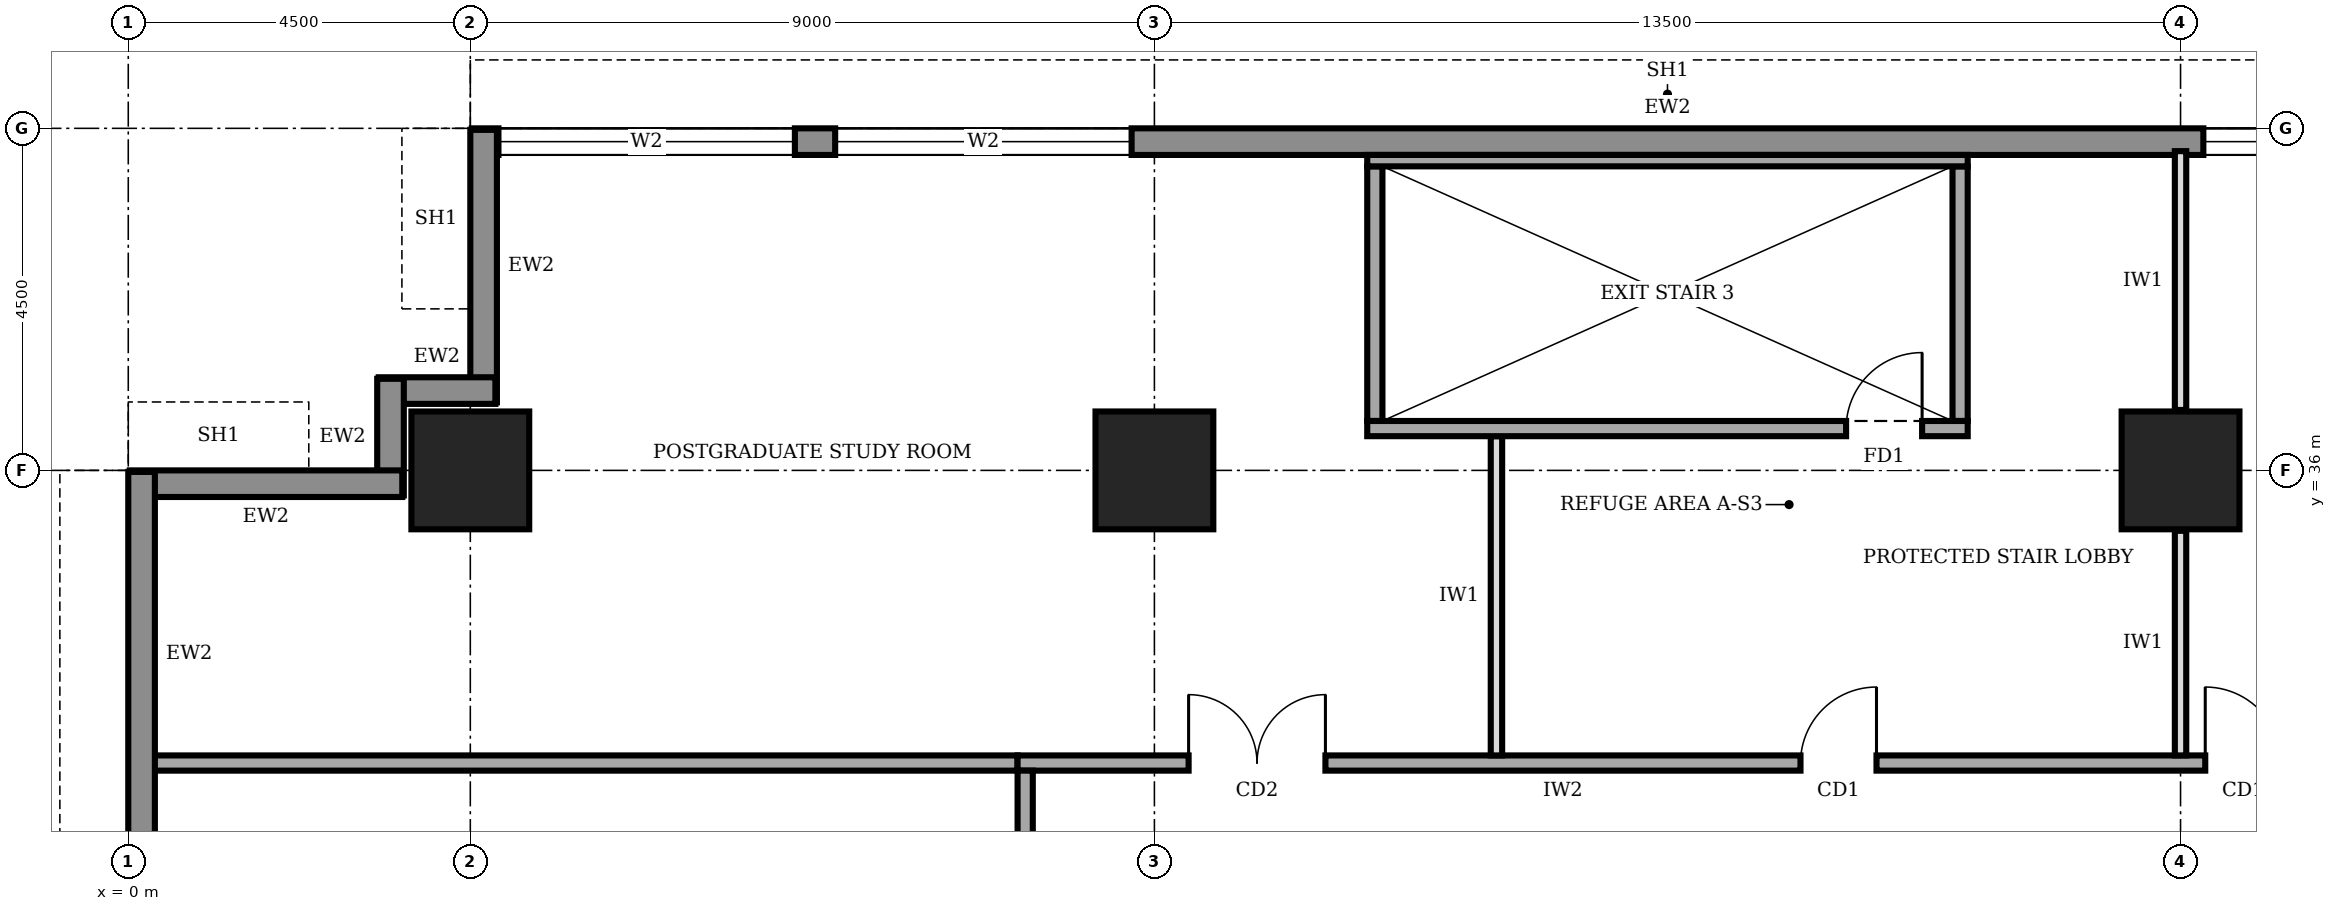
"""IFC4 building model, lengths in metres.
Left out: names, types, materials, properties, quantities, classifications, styles, units other than length and angle.
Written with IfcOpenShell. Run it as: python <this file> out.ifc"""

import sys

from ifc_helpers import new_model, si_unit, direction, frame, frame_2d, origin, origin_2d, place, context, subcontext, project, spatial, rectangle, extrude, element, fill, save


model = new_model("IFC4")
c1 = context("Model", 3, precision=1e-05, world=origin(), true_north=direction((0.0, 1.0)))
c2 = subcontext(c1, "Body", "Model", "MODEL_VIEW")
j1 = project(units=[si_unit("LENGTHUNIT", "METRE"), si_unit("PLANEANGLEUNIT", "RADIAN")], contexts=[c1])
p1 = place(None, origin())
s1 = spatial("IfcSite", under=j1, at=p1, CompositionType="ELEMENT")
p2 = place(p1, origin())
s2 = spatial("IfcBuilding", under=s1, at=p2, CompositionType="ELEMENT")
p3 = place(p2, frame((0.0, 0.0, 233.0)))
s3 = spatial("IfcBuildingStorey", under=s2, at=p3, CompositionType="ELEMENT", Elevation=233.0)
for number, where, z_axis, x_axis in (
    (1, (4.5, 36.0, 0.0), (0.0, 0.0, 1.0), (1.0, 0.0, 0.0)),
    (2, (13.5, 36.0, 0.0), (0.0, 0.0, 1.0), (1.0, 0.0, 0.0)),
    (3, (27.0, 36.0, 0.0), (0.0, 0.0, 1.0), (1.0, 0.0, 0.0)),
):
    element("IfcColumn", number, at=place(p3, frame(where, z_axis=z_axis, x_axis=x_axis)), inside=s3, PredefinedType="COLUMN", context=c2, shape_type="SweptSolid", body=[
        extrude(rectangle(XDim=1.55, YDim=1.55, at=origin_2d()), origin(), (0.0, 0.0, 1.0), 4.0),
    ])
p4 = place(p3, frame((35.98, 40.325, 0.0), z_axis=(0.0, 0.0, 1.0), x_axis=(-1.0, 0.0, 0.0)))
e4 = element("IfcWall", 4, at=p4, inside=s3, PredefinedType="STANDARD", context=c2, shape_type="SweptSolid", body=[
    extrude(rectangle(XDim=31.46, YDim=0.35, at=frame_2d((15.73, 0.0))), origin(), (0.0, 0.0, 1.0), 3.75),
])
p5 = place(p4, frame((27.21, 0.0, 0.6)))
e5 = element("IfcOpeningElement", 5, at=p5, cuts=e4, PredefinedType="OPENING", context=c2, shape_type="SweptSolid", body=[
    extrude(rectangle(XDim=3.9, YDim=2.6, at=frame_2d((1.95, 1.3))), frame((0.0, 0.185, 0.0), z_axis=(0.0, -1.0, 0.0), x_axis=(1.0, 0.0, 0.0)), (0.0, 0.0, 1.0), 0.37),
])
p6 = place(p4, frame((22.78, 0.0, 0.6)))
e6 = element("IfcOpeningElement", 6, at=p6, cuts=e4, PredefinedType="OPENING", context=c2, shape_type="SweptSolid", body=[
    extrude(rectangle(XDim=3.9, YDim=2.6, at=frame_2d((1.95, 1.3))), frame((0.0, 0.185, 0.0), z_axis=(0.0, -1.0, 0.0), x_axis=(1.0, 0.0, 0.0)), (0.0, 0.0, 1.0), 0.37),
])
p7 = place(p4, frame((4.78, 0.0, 0.6)))
e7 = element("IfcOpeningElement", 7, at=p7, cuts=e4, PredefinedType="OPENING", context=c2, shape_type="SweptSolid", body=[
    extrude(rectangle(XDim=3.9, YDim=2.6, at=frame_2d((1.95, 1.3))), frame((0.0, 0.185, 0.0), z_axis=(0.0, -1.0, 0.0), x_axis=(1.0, 0.0, 0.0)), (0.0, 0.0, 1.0), 0.37),
])
p8 = place(p3, frame((4.675, 40.48, 0.0), z_axis=(0.0, 0.0, 1.0), x_axis=(0.0, -1.0, 0.0)))
e8 = element("IfcWall", 8, at=p8, inside=s3, PredefinedType="STANDARD", context=c2, shape_type="SweptSolid", body=[
    extrude(rectangle(XDim=3.585, YDim=0.35, at=frame_2d((1.792, 0.0))), origin(), (0.0, 0.0, 1.0), 2.85),
])
for number, where, z_axis, x_axis in (
    (9, (4.83, 37.05, 0.0), (0.0, 0.0, 1.0), (-1.0, 0.0, 0.0)),
    (10, (3.45, 37.205, 0.0), (0.0, 0.0, 1.0), (0.0, -1.0, 0.0)),
):
    element("IfcWall", number, at=place(p3, frame(where, z_axis=z_axis, x_axis=x_axis)), inside=s3, PredefinedType="STANDARD", context=c2, shape_type="SweptSolid", body=[
        extrude(rectangle(XDim=1.535, YDim=0.35, at=frame_2d((0.768, 0.0))), origin(), (0.0, 0.0, 1.0), 3.75),
    ])
p9 = place(p3, frame((3.605, 35.825, 0.0), z_axis=(0.0, 0.0, 1.0), x_axis=(-1.0, 0.0, 0.0)))
e11 = element("IfcWall", 11, at=p9, inside=s3, PredefinedType="STANDARD", context=c2, shape_type="SweptSolid", body=[
    extrude(rectangle(XDim=3.585, YDim=0.35, at=frame_2d((1.792, 0.0))), origin(), (0.0, 0.0, 1.0), 2.85),
])
p10 = place(p3, frame((0.175, 35.98, 0.0), z_axis=(0.0, 0.0, 1.0), x_axis=(0.0, -1.0, 0.0)))
e12 = element("IfcWall", 12, at=p10, inside=s3, PredefinedType="STANDARD", context=c2, shape_type="SweptSolid", body=[
    extrude(rectangle(XDim=31.46, YDim=0.35, at=frame_2d((15.73, 0.0))), origin(), (0.0, 0.0, 1.0), 3.75),
])
p11 = place(p10, frame((27.21, 0.0, 0.6)))
e13 = element("IfcOpeningElement", 13, at=p11, cuts=e12, PredefinedType="OPENING", context=c2, shape_type="SweptSolid", body=[
    extrude(rectangle(XDim=3.9, YDim=2.6, at=frame_2d((1.95, 1.3))), frame((0.0, 0.185, 0.0), z_axis=(0.0, -1.0, 0.0), x_axis=(1.0, 0.0, 0.0)), (0.0, 0.0, 1.0), 0.37),
])
p12 = place(p10, frame((22.78, 0.0, 0.6)))
e14 = element("IfcOpeningElement", 14, at=p12, cuts=e12, PredefinedType="OPENING", context=c2, shape_type="SweptSolid", body=[
    extrude(rectangle(XDim=3.9, YDim=2.6, at=frame_2d((1.95, 1.3))), frame((0.0, 0.185, 0.0), z_axis=(0.0, -1.0, 0.0), x_axis=(1.0, 0.0, 0.0)), (0.0, 0.0, 1.0), 0.37),
])
p13 = place(p10, frame((18.28, 0.0, 0.6)))
e15 = element("IfcOpeningElement", 15, at=p13, cuts=e12, PredefinedType="OPENING", context=c2, shape_type="SweptSolid", body=[
    extrude(rectangle(XDim=3.9, YDim=2.6, at=frame_2d((1.95, 1.3))), frame((0.0, 0.185, 0.0), z_axis=(0.0, -1.0, 0.0), x_axis=(1.0, 0.0, 0.0)), (0.0, 0.0, 1.0), 0.37),
])
p14 = place(p10, frame((13.78, 0.0, 0.6)))
e16 = element("IfcOpeningElement", 16, at=p14, cuts=e12, PredefinedType="OPENING", context=c2, shape_type="SweptSolid", body=[
    extrude(rectangle(XDim=3.9, YDim=2.6, at=frame_2d((1.95, 1.3))), frame((0.0, 0.185, 0.0), z_axis=(0.0, -1.0, 0.0), x_axis=(1.0, 0.0, 0.0)), (0.0, 0.0, 1.0), 0.37),
])
p15 = place(p10, frame((9.28, 0.0, 0.6)))
e17 = element("IfcOpeningElement", 17, at=p15, cuts=e12, PredefinedType="OPENING", context=c2, shape_type="SweptSolid", body=[
    extrude(rectangle(XDim=3.9, YDim=2.6, at=frame_2d((1.95, 1.3))), frame((0.0, 0.185, 0.0), z_axis=(0.0, -1.0, 0.0), x_axis=(1.0, 0.0, 0.0)), (0.0, 0.0, 1.0), 0.37),
])
p16 = place(p10, frame((4.78, 0.0, 0.6)))
e18 = element("IfcOpeningElement", 18, at=p16, cuts=e12, PredefinedType="OPENING", context=c2, shape_type="SweptSolid", body=[
    extrude(rectangle(XDim=3.9, YDim=2.6, at=frame_2d((1.95, 1.3))), frame((0.0, 0.185, 0.0), z_axis=(0.0, -1.0, 0.0), x_axis=(1.0, 0.0, 0.0)), (0.0, 0.0, 1.0), 0.37),
])
p17 = place(p3, frame((28.6, 32.15, 0.0), z_axis=(0.0, 0.0, 1.0), x_axis=(-1.0, 0.0, 0.0)))
e19 = element("IfcWall", 19, at=p17, inside=s3, PredefinedType="SOLIDWALL", context=c2, shape_type="SweptSolid", body=[
    extrude(rectangle(XDim=16.9, YDim=0.2, at=frame_2d((8.45, 0.0))), origin(), (0.0, 0.0, 1.0), 3.75),
])
p18 = place(p17, frame((12.85, 0.0, 0.0)))
e20 = element("IfcOpeningElement", 20, at=p18, cuts=e19, PredefinedType="OPENING", context=c2, shape_type="SweptSolid", body=[
    extrude(rectangle(XDim=1.8, YDim=2.1, at=frame_2d((0.9, 1.05))), frame((0.0, 0.11, 0.0), z_axis=(0.0, -1.0, 0.0), x_axis=(1.0, 0.0, 0.0)), (0.0, 0.0, 1.0), 0.22),
])
p19 = place(p17, frame((5.6, 0.0, 0.0)))
e21 = element("IfcOpeningElement", 21, at=p19, cuts=e19, PredefinedType="OPENING", context=c2, shape_type="SweptSolid", body=[
    extrude(rectangle(XDim=1.0, YDim=2.1, at=frame_2d((0.5, 1.05))), frame((0.0, 0.11, 0.0), z_axis=(0.0, -1.0, 0.0), x_axis=(1.0, 0.0, 0.0)), (0.0, 0.0, 1.0), 0.22),
])
p20 = place(p17, frame((0.275, 0.0, 0.0)))
e22 = element("IfcOpeningElement", 22, at=p20, cuts=e19, PredefinedType="OPENING", context=c2, shape_type="SweptSolid", body=[
    extrude(rectangle(XDim=1.0, YDim=2.1, at=frame_2d((0.5, 1.05))), frame((0.0, 0.11, 0.0), z_axis=(0.0, -1.0, 0.0), x_axis=(1.0, 0.0, 0.0)), (0.0, 0.0, 1.0), 0.22),
])
p21 = place(p3, frame((11.8, 32.05, 0.0), z_axis=(0.0, 0.0, 1.0), x_axis=(0.0, -1.0, 0.0)))
e23 = element("IfcWall", 23, at=p21, inside=s3, PredefinedType="SOLIDWALL", context=c2, shape_type="SweptSolid", body=[
    extrude(rectangle(XDim=23.05, YDim=0.2, at=frame_2d((11.525, 0.0))), origin(), (0.0, 0.0, 1.0), 3.75),
])
p22 = place(p21, frame((20.3, 0.0, 0.0)))
e24 = element("IfcOpeningElement", 24, at=p22, cuts=e23, PredefinedType="OPENING", context=c2, shape_type="SweptSolid", body=[
    extrude(rectangle(XDim=1.0, YDim=2.1, at=frame_2d((0.5, 1.05))), frame((0.0, 0.11, 0.0), z_axis=(0.0, -1.0, 0.0), x_axis=(1.0, 0.0, 0.0)), (0.0, 0.0, 1.0), 0.22),
])
p23 = place(p21, frame((16.2, 0.0, 0.0)))
e25 = element("IfcOpeningElement", 25, at=p23, cuts=e23, PredefinedType="OPENING", context=c2, shape_type="SweptSolid", body=[
    extrude(rectangle(XDim=0.9, YDim=2.1, at=frame_2d((0.45, 1.05))), frame((0.0, 0.11, 0.0), z_axis=(0.0, -1.0, 0.0), x_axis=(1.0, 0.0, 0.0)), (0.0, 0.0, 1.0), 0.22),
])
p24 = place(p21, frame((13.2, 0.0, 0.0)))
e26 = element("IfcOpeningElement", 26, at=p24, cuts=e23, PredefinedType="OPENING", context=c2, shape_type="SweptSolid", body=[
    extrude(rectangle(XDim=0.9, YDim=2.1, at=frame_2d((0.45, 1.05))), frame((0.0, 0.11, 0.0), z_axis=(0.0, -1.0, 0.0), x_axis=(1.0, 0.0, 0.0)), (0.0, 0.0, 1.0), 0.22),
])
p25 = place(p21, frame((8.35, 0.0, 0.0)))
e27 = element("IfcOpeningElement", 27, at=p25, cuts=e23, PredefinedType="OPENING", context=c2, shape_type="SweptSolid", body=[
    extrude(rectangle(XDim=0.9, YDim=2.1, at=frame_2d((0.45, 1.05))), frame((0.0, 0.11, 0.0), z_axis=(0.0, -1.0, 0.0), x_axis=(1.0, 0.0, 0.0)), (0.0, 0.0, 1.0), 0.22),
])
p26 = place(p21, frame((5.55, 0.0, 0.0)))
e28 = element("IfcOpeningElement", 28, at=p26, cuts=e23, PredefinedType="OPENING", context=c2, shape_type="SweptSolid", body=[
    extrude(rectangle(XDim=1.0, YDim=2.1, at=frame_2d((0.5, 1.05))), frame((0.0, 0.11, 0.0), z_axis=(0.0, -1.0, 0.0), x_axis=(1.0, 0.0, 0.0)), (0.0, 0.0, 1.0), 0.22),
])
p27 = place(p21, frame((11.05, 0.0, 0.0)))
e29 = element("IfcOpeningElement", 29, at=p27, cuts=e23, PredefinedType="OPENING", context=c2, shape_type="SweptSolid", body=[
    extrude(rectangle(XDim=1.0, YDim=2.1, at=frame_2d((0.5, 1.05))), frame((0.0, 0.11, 0.0), z_axis=(0.0, -1.0, 0.0), x_axis=(1.0, 0.0, 0.0)), (0.0, 0.0, 1.0), 0.22),
])
p28 = place(p21, frame((1.925, 0.0, 0.0)))
e30 = element("IfcOpeningElement", 30, at=p28, cuts=e23, PredefinedType="OPENING", context=c2, shape_type="SweptSolid", body=[
    extrude(rectangle(XDim=1.0, YDim=2.1, at=frame_2d((0.5, 1.05))), frame((0.0, 0.11, 0.0), z_axis=(0.0, -1.0, 0.0), x_axis=(1.0, 0.0, 0.0)), (0.0, 0.0, 1.0), 0.22),
])
p29 = place(p3, frame((0.3, 32.15, 0.0), z_axis=(0.0, 0.0, 1.0), x_axis=(1.0, 0.0, 0.0)))
e31 = element("IfcWall", 31, at=p29, inside=s3, PredefinedType="SOLIDWALL", context=c2, shape_type="SweptSolid", body=[
    extrude(rectangle(XDim=11.4, YDim=0.2, at=frame_2d((5.7, 0.0))), origin(), (0.0, 0.0, 1.0), 3.75),
])
p30 = place(p3, frame((18.0, 32.25, 0.0), z_axis=(0.0, 0.0, 1.0), x_axis=(0.0, 1.0, 0.0)))
e32 = element("IfcWall", 32, at=p30, inside=s3, PredefinedType="PARTITIONING", context=c2, shape_type="SweptSolid", body=[
    extrude(rectangle(XDim=4.2, YDim=0.15, at=frame_2d((2.1, 0.0))), origin(), (0.0, 0.0, 1.0), 3.75),
])
p31 = place(p3, frame((27.0, 32.25, 0.0), z_axis=(0.0, 0.0, 1.0), x_axis=(0.0, 1.0, 0.0)))
e33 = element("IfcWall", 33, at=p31, inside=s3, PredefinedType="PARTITIONING", context=c2, shape_type="SweptSolid", body=[
    extrude(rectangle(XDim=2.955, YDim=0.15, at=frame_2d((1.478, 0.0))), origin(), (0.0, 0.0, 1.0), 2.85),
])
p32 = place(p3, frame((27.0, 36.795, 0.0), z_axis=(0.0, 0.0, 1.0), x_axis=(0.0, 1.0, 0.0)))
e34 = element("IfcWall", 34, at=p32, inside=s3, PredefinedType="PARTITIONING", context=c2, shape_type="SweptSolid", body=[
    extrude(rectangle(XDim=3.405, YDim=0.15, at=frame_2d((1.703, 0.0))), origin(), (0.0, 0.0, 1.0), 2.85),
])
p33 = place(p3, frame((16.3, 36.55, 0.0), z_axis=(0.0, 0.0, 1.0), x_axis=(1.0, 0.0, 0.0)))
e35 = element("IfcWall", 35, at=p33, inside=s3, PredefinedType="SOLIDWALL", context=c2, shape_type="SweptSolid", body=[
    extrude(rectangle(XDim=7.9, YDim=0.2, at=frame_2d((3.95, 0.0))), origin(), (0.0, 0.0, 1.0), 3.75),
])
p34 = place(p33, frame((6.3, 0.0, 0.0)))
e36 = element("IfcOpeningElement", 36, at=p34, cuts=e35, PredefinedType="OPENING", context=c2, shape_type="SweptSolid", body=[
    extrude(rectangle(XDim=1.0, YDim=2.1, at=frame_2d((0.5, 1.05))), frame((0.0, 0.11, 0.0), z_axis=(0.0, -1.0, 0.0), x_axis=(1.0, 0.0, 0.0)), (0.0, 0.0, 1.0), 0.22),
])
p35 = place(p3, frame((16.3, 40.075, 0.0), z_axis=(0.0, 0.0, 1.0), x_axis=(1.0, 0.0, 0.0)))
e37 = element("IfcWall", 37, at=p35, inside=s3, PredefinedType="SOLIDWALL", context=c2, shape_type="SweptSolid", body=[
    extrude(rectangle(XDim=7.9, YDim=0.15, at=frame_2d((3.95, 0.0))), origin(), (0.0, 0.0, 1.0), 3.75),
])
for number, where, z_axis, x_axis in (
    (38, (16.4, 36.65, 0.0), (0.0, 0.0, 1.0), (0.0, 1.0, 0.0)),
    (39, (24.1, 36.65, 0.0), (0.0, 0.0, 1.0), (0.0, 1.0, 0.0)),
):
    element("IfcWall", number, at=place(p3, frame(where, z_axis=z_axis, x_axis=x_axis)), inside=s3, PredefinedType="SOLIDWALL", context=c2, shape_type="SweptSolid", body=[
        extrude(rectangle(XDim=3.35, YDim=0.2, at=frame_2d((1.675, 0.0))), origin(), (0.0, 0.0, 1.0), 3.75),
    ])
p36 = place(p5, origin())
e40 = element("IfcWindow", 40, at=p36, inside=s3, PartitioningType="SINGLE_PANEL", PredefinedType="WINDOW", context=c2, shape_type="SweptSolid", body=[
    extrude(rectangle(XDim=3.9, YDim=2.6, at=frame_2d((1.95, 1.3))), frame((0.0, 0.03, 0.0), z_axis=(0.0, -1.0, 0.0), x_axis=(1.0, 0.0, 0.0)), (0.0, 0.0, 1.0), 0.06),
])
fill(e5, e40)
p37 = place(p6, origin())
e41 = element("IfcWindow", 41, at=p37, inside=s3, PartitioningType="SINGLE_PANEL", PredefinedType="WINDOW", context=c2, shape_type="SweptSolid", body=[
    extrude(rectangle(XDim=3.9, YDim=2.6, at=frame_2d((1.95, 1.3))), frame((0.0, 0.03, 0.0), z_axis=(0.0, -1.0, 0.0), x_axis=(1.0, 0.0, 0.0)), (0.0, 0.0, 1.0), 0.06),
])
fill(e6, e41)
p38 = place(p7, origin())
e42 = element("IfcWindow", 42, at=p38, inside=s3, PartitioningType="SINGLE_PANEL", PredefinedType="WINDOW", context=c2, shape_type="SweptSolid", body=[
    extrude(rectangle(XDim=3.9, YDim=2.6, at=frame_2d((1.95, 1.3))), frame((0.0, 0.03, 0.0), z_axis=(0.0, -1.0, 0.0), x_axis=(1.0, 0.0, 0.0)), (0.0, 0.0, 1.0), 0.06),
])
fill(e7, e42)
p39 = place(p18, frame((1.8, 0.0, 0.0), z_axis=(0.0, 0.0, 1.0), x_axis=(-1.0, 0.0, 0.0)))
e43 = element("IfcDoor", 43, at=p39, inside=s3, OperationType="DOUBLE_DOOR_SINGLE_SWING", PredefinedType="DOOR", context=c2, shape_type="SweptSolid", body=[
    extrude(rectangle(XDim=1.8, YDim=2.1, at=frame_2d((0.9, 1.05))), frame((0.0, 0.025, 0.0), z_axis=(0.0, -1.0, 0.0), x_axis=(1.0, 0.0, 0.0)), (0.0, 0.0, 1.0), 0.05),
])
fill(e20, e43)
p40 = place(p19, frame((1.0, 0.0, 0.0), z_axis=(0.0, 0.0, 1.0), x_axis=(-1.0, 0.0, 0.0)))
e44 = element("IfcDoor", 44, at=p40, inside=s3, OperationType="SINGLE_SWING_RIGHT", PredefinedType="DOOR", context=c2, shape_type="SweptSolid", body=[
    extrude(rectangle(XDim=1.0, YDim=2.1, at=frame_2d((0.5, 1.05))), frame((0.0, 0.025, 0.0), z_axis=(0.0, -1.0, 0.0), x_axis=(1.0, 0.0, 0.0)), (0.0, 0.0, 1.0), 0.05),
])
fill(e21, e44)
p41 = place(p20, frame((1.0, 0.0, 0.0), z_axis=(0.0, 0.0, 1.0), x_axis=(-1.0, 0.0, 0.0)))
e45 = element("IfcDoor", 45, at=p41, inside=s3, OperationType="SINGLE_SWING_LEFT", PredefinedType="DOOR", context=c2, shape_type="SweptSolid", body=[
    extrude(rectangle(XDim=1.0, YDim=2.1, at=frame_2d((0.5, 1.05))), frame((0.0, 0.025, 0.0), z_axis=(0.0, -1.0, 0.0), x_axis=(1.0, 0.0, 0.0)), (0.0, 0.0, 1.0), 0.05),
])
fill(e22, e45)
p42 = place(p34, origin())
e46 = element("IfcDoor", 46, at=p42, inside=s3, OperationType="SINGLE_SWING_RIGHT", PredefinedType="DOOR", context=c2, shape_type="SweptSolid", body=[
    extrude(rectangle(XDim=1.0, YDim=2.1, at=frame_2d((0.5, 1.05))), frame((0.0, 0.025, 0.0), z_axis=(0.0, -1.0, 0.0), x_axis=(1.0, 0.0, 0.0)), (0.0, 0.0, 1.0), 0.05),
])
fill(e36, e46)
save(model, sys.argv[1])
